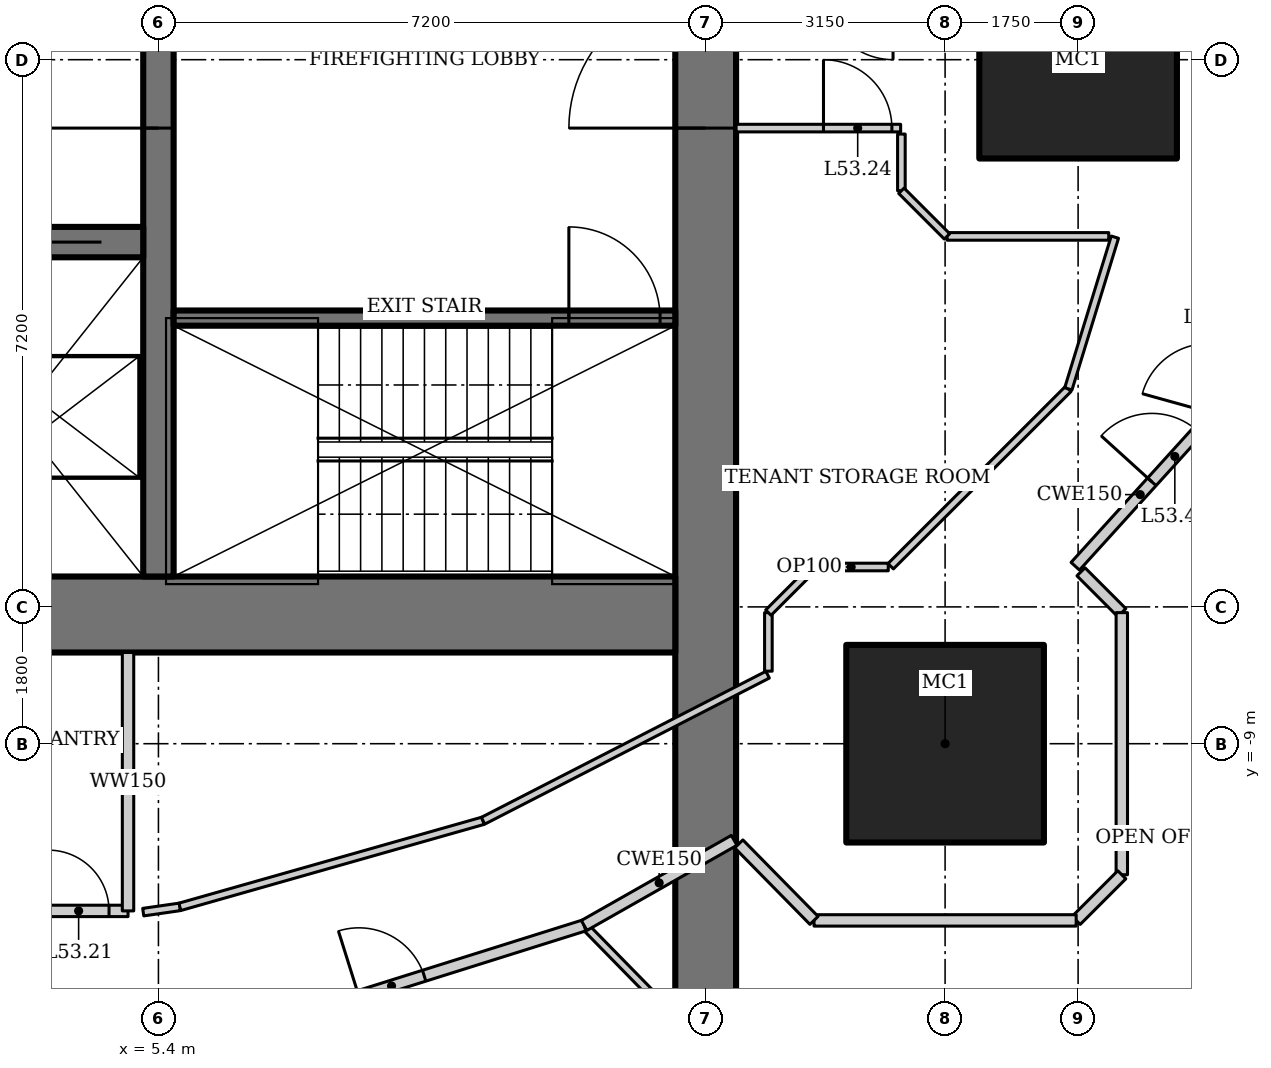
"""IFC4 building model, lengths in metres.
Left out: names, types, materials, properties, quantities, classifications, styles, units other than length and angle.
Written with IfcOpenShell. Run it as: python <this file> out.ifc"""

import sys

from ifc_helpers import new_model, si_unit, direction, frame, frame_2d, origin, origin_2d, place, context, subcontext, project, spatial, rectangle, hollow_rectangle, extrude, element, fill, save


model = new_model("IFC4")
c1 = context("Model", 3, precision=1e-05, world=origin(), true_north=direction((0.0, 1.0)))
c2 = subcontext(c1, "Body", "Model", "MODEL_VIEW")
j1 = project(units=[si_unit("LENGTHUNIT", "METRE"), si_unit("PLANEANGLEUNIT", "RADIAN")], contexts=[c1])
p1 = place(None, origin())
s1 = spatial("IfcSite", under=j1, at=p1, CompositionType="ELEMENT")
p2 = place(p1, origin())
s2 = spatial("IfcBuilding", under=s1, at=p2, CompositionType="ELEMENT")
p3 = place(p2, frame((0.0, 0.0, 228.4)))
s3 = spatial("IfcBuildingStorey", under=s2, at=p3, CompositionType="ELEMENT", Elevation=228.4)
for number, where, z_axis, x_axis in (
    (1, (17.5, 0.0, 0.0), (0.0, 0.0, 1.0), (1.0, 0.0, 0.0)),
    (2, (15.75, -9.0, 0.0), (0.0, 0.0, 1.0), (1.0, 0.0, 0.0)),
):
    element("IfcColumn", number, at=place(p3, frame(where, z_axis=z_axis, x_axis=x_axis)), inside=s3, PredefinedType="COLUMN", context=c2, shape_type="SweptSolid", body=[
        extrude(hollow_rectangle(XDim=2.6, YDim=2.6, WallThickness=0.13, at=origin_2d()), origin(), (0.0, 0.0, 1.0), 4.2),
    ])
p4 = place(p3, frame((12.6, -13.0, 0.0), z_axis=(0.0, 0.0, 1.0), x_axis=(0.0, 1.0, 0.0)))
e3 = element("IfcWall", 3, at=p4, inside=s3, PredefinedType="SHEAR", context=c2, shape_type="SweptSolid", body=[
    extrude(rectangle(XDim=26.0, YDim=0.8, at=frame_2d((13.0, 0.0))), origin(), (0.0, 0.0, 1.0), 4.2),
])
p5 = place(p4, frame((12.1, 0.0, 0.0)))
e4 = element("IfcOpeningElement", 4, at=p5, cuts=e3, PredefinedType="OPENING", context=c2, shape_type="SweptSolid", body=[
    extrude(rectangle(XDim=1.8, YDim=2.1, at=frame_2d((0.9, 1.05))), frame((0.0, 0.41, 0.0), z_axis=(0.0, -1.0, 0.0), x_axis=(1.0, 0.0, 0.0)), (0.0, 0.0, 1.0), 0.82),
])
p6 = place(p3, frame((-12.2, -7.3, 0.0), z_axis=(0.0, 0.0, 1.0), x_axis=(1.0, 0.0, 0.0)))
e5 = element("IfcWall", 5, at=p6, inside=s3, PredefinedType="SHEAR", context=c2, shape_type="SweptSolid", body=[
    extrude(rectangle(XDim=24.4, YDim=1.0, at=frame_2d((12.2, 0.0))), origin(), (0.0, 0.0, 1.0), 4.2),
])
p7 = place(p3, frame((5.4, -6.8, 0.0), z_axis=(0.0, 0.0, 1.0), x_axis=(0.0, 1.0, 0.0)))
e6 = element("IfcWall", 6, at=p7, inside=s3, PredefinedType="SHEAR", context=c2, shape_type="SweptSolid", body=[
    extrude(rectangle(XDim=14.6, YDim=0.4, at=frame_2d((7.3, 0.0))), origin(), (0.0, 0.0, 1.0), 4.2),
])
p8 = place(p7, frame((5.9, 0.0, 0.0)))
e7 = element("IfcOpeningElement", 7, at=p8, cuts=e6, PredefinedType="OPENING", context=c2, shape_type="SweptSolid", body=[
    extrude(rectangle(XDim=1.8, YDim=2.1, at=frame_2d((0.9, 1.05))), frame((0.0, 0.21, 0.0), z_axis=(0.0, -1.0, 0.0), x_axis=(1.0, 0.0, 0.0)), (0.0, 0.0, 1.0), 0.42),
])
p9 = place(p3, frame((-5.2, -2.4, 0.0), z_axis=(0.0, 0.0, 1.0), x_axis=(1.0, 0.0, 0.0)))
e8 = element("IfcWall", 8, at=p9, inside=s3, PredefinedType="SHEAR", context=c2, shape_type="SweptSolid", body=[
    extrude(rectangle(XDim=10.4, YDim=0.4, at=frame_2d((5.2, 0.0))), origin(), (0.0, 0.0, 1.0), 4.2),
])
p10 = place(p9, frame((1.683, 0.0, 0.0)))
e9 = element("IfcOpeningElement", 9, at=p10, cuts=e8, PredefinedType="OPENING", context=c2, shape_type="SweptSolid", body=[
    extrude(rectangle(XDim=1.1, YDim=2.2, at=frame_2d((0.55, 1.1))), frame((0.0, 0.21, 0.0), z_axis=(0.0, -1.0, 0.0), x_axis=(1.0, 0.0, 0.0)), (0.0, 0.0, 1.0), 0.42),
])
p11 = place(p9, frame((5.217, 0.0, 0.0)))
e10 = element("IfcOpeningElement", 10, at=p11, cuts=e8, PredefinedType="OPENING", context=c2, shape_type="SweptSolid", body=[
    extrude(rectangle(XDim=1.1, YDim=2.2, at=frame_2d((0.55, 1.1))), frame((0.0, 0.21, 0.0), z_axis=(0.0, -1.0, 0.0), x_axis=(1.0, 0.0, 0.0)), (0.0, 0.0, 1.0), 0.42),
])
p12 = place(p9, frame((8.75, 0.0, 0.0)))
e11 = element("IfcOpeningElement", 11, at=p12, cuts=e8, PredefinedType="OPENING", context=c2, shape_type="SweptSolid", body=[
    extrude(rectangle(XDim=1.1, YDim=2.2, at=frame_2d((0.55, 1.1))), frame((0.0, 0.21, 0.0), z_axis=(0.0, -1.0, 0.0), x_axis=(1.0, 0.0, 0.0)), (0.0, 0.0, 1.0), 0.42),
])
p13 = place(p3, frame((5.6, -3.4, 0.0), z_axis=(0.0, 0.0, 1.0), x_axis=(1.0, 0.0, 0.0)))
e12 = element("IfcWall", 12, at=p13, inside=s3, PredefinedType="SHEAR", context=c2, shape_type="SweptSolid", body=[
    extrude(rectangle(XDim=6.6, YDim=0.2, at=frame_2d((3.3, 0.0))), origin(), (0.0, 0.0, 1.0), 4.2),
])
p14 = place(p13, frame((5.2, 0.0, 0.0)))
e13 = element("IfcOpeningElement", 13, at=p14, cuts=e12, PredefinedType="OPENING", context=c2, shape_type="SweptSolid", body=[
    extrude(rectangle(XDim=1.2, YDim=2.1, at=frame_2d((0.6, 1.05))), frame((0.0, 0.11, 0.0), z_axis=(0.0, -1.0, 0.0), x_axis=(1.0, 0.0, 0.0)), (0.0, 0.0, 1.0), 0.22),
])
p15 = place(p3, frame((15.709, -16.199, 0.0), z_axis=(0.0, 0.0, 1.0), x_axis=(-0.699758297028, 0.71437967898, 0.0)))
e14 = element("IfcWall", 14, at=p15, inside=s3, PredefinedType="PARTITIONING", context=c2, shape_type="SweptSolid", body=[
    extrude(rectangle(XDim=6.729, YDim=0.1, at=frame_2d((3.365, 0.0))), origin(), (0.0, 0.0, 1.0), 3.41),
])
p16 = place(p3, frame((6.521, -12.799, 0.0), z_axis=(0.0, 0.0, 1.0), x_axis=(0.954031103669, 0.299707612903, 0.0)))
e15 = element("IfcWall", 15, at=p16, inside=s3, PredefinedType="PARTITIONING", context=c2, shape_type="SweptSolid", body=[
    extrude(rectangle(XDim=4.695, YDim=0.15, at=frame_2d((2.348, 0.0))), origin(), (0.0, 0.0, 1.0), 4.05),
])
p17 = place(p16, frame((1.589, 0.0, 0.0)))
e16 = element("IfcOpeningElement", 16, at=p17, cuts=e15, PredefinedType="OPENING", context=c2, shape_type="SweptSolid", body=[
    extrude(rectangle(XDim=0.9, YDim=2.1, at=frame_2d((0.45, 1.05))), frame((0.0, 0.085, 0.0), z_axis=(0.0, -1.0, 0.0), x_axis=(1.0, 0.0, 0.0)), (0.0, 0.0, 1.0), 0.17),
])
p18 = place(p3, frame((-5.0, -11.2, 0.0), z_axis=(0.0, 0.0, 1.0), x_axis=(1.0, 0.0, 0.0)))
e17 = element("IfcWall", 17, at=p18, inside=s3, PredefinedType="SOLIDWALL", context=c2, shape_type="SweptSolid", body=[
    extrude(rectangle(XDim=10.0, YDim=0.15, at=frame_2d((5.0, 0.0))), origin(), (0.0, 0.0, 1.0), 4.05),
])
p19 = place(p18, frame((0.45, 0.0, 0.0)))
e18 = element("IfcOpeningElement", 18, at=p19, cuts=e17, PredefinedType="OPENING", context=c2, shape_type="SweptSolid", body=[
    extrude(rectangle(XDim=1.0, YDim=2.1, at=frame_2d((0.5, 1.05))), frame((0.0, 0.085, 0.0), z_axis=(0.0, -1.0, 0.0), x_axis=(1.0, 0.0, 0.0)), (0.0, 0.0, 1.0), 0.17),
])
p20 = place(p18, frame((3.15, 0.0, 0.0)))
e19 = element("IfcOpeningElement", 19, at=p20, cuts=e17, PredefinedType="OPENING", context=c2, shape_type="SweptSolid", body=[
    extrude(rectangle(XDim=0.9, YDim=2.1, at=frame_2d((0.45, 1.05))), frame((0.0, 0.085, 0.0), z_axis=(0.0, -1.0, 0.0), x_axis=(1.0, 0.0, 0.0)), (0.0, 0.0, 1.0), 0.17),
])
p21 = place(p18, frame((6.55, 0.0, 0.0)))
e20 = element("IfcOpeningElement", 20, at=p21, cuts=e17, PredefinedType="OPENING", context=c2, shape_type="SweptSolid", body=[
    extrude(rectangle(XDim=0.9, YDim=2.1, at=frame_2d((0.45, 1.05))), frame((0.0, 0.085, 0.0), z_axis=(0.0, -1.0, 0.0), x_axis=(1.0, 0.0, 0.0)), (0.0, 0.0, 1.0), 0.17),
])
p22 = place(p18, frame((8.95, 0.0, 0.0)))
e21 = element("IfcOpeningElement", 21, at=p22, cuts=e17, PredefinedType="OPENING", context=c2, shape_type="SweptSolid", body=[
    extrude(rectangle(XDim=0.8, YDim=2.1, at=frame_2d((0.4, 1.05))), frame((0.0, 0.085, 0.0), z_axis=(0.0, -1.0, 0.0), x_axis=(1.0, 0.0, 0.0)), (0.0, 0.0, 1.0), 0.17),
])
p23 = place(p3, frame((5.0, -7.8, 0.0), z_axis=(0.0, 0.0, 1.0), x_axis=(0.0, -1.0, 0.0)))
e22 = element("IfcWall", 22, at=p23, inside=s3, PredefinedType="SOLIDWALL", context=c2, shape_type="SweptSolid", body=[
    extrude(rectangle(XDim=3.4, YDim=0.15, at=frame_2d((1.7, 0.0))), origin(), (0.0, 0.0, 1.0), 4.05),
])
p24 = place(p3, frame((9.67, -10.014, 0.0), z_axis=(0.0, 0.0, 1.0), x_axis=(-0.961973498971, -0.273142796496, 0.0)))
e23 = element("IfcWall", 23, at=p24, inside=s3, PredefinedType="PARTITIONING", context=c2, shape_type="SweptSolid", body=[
    extrude(rectangle(XDim=4.148, YDim=0.1, at=frame_2d((2.074, 0.0))), origin(), (0.0, 0.0, 1.0), 4.05),
])
p25 = place(p3, frame((5.68, -11.147, 0.0), z_axis=(0.0, 0.0, 1.0), x_axis=(-0.989797891768, -0.142478536811, 0.0)))
e24 = element("IfcWall", 24, at=p25, inside=s3, PredefinedType="PARTITIONING", context=c2, shape_type="SweptSolid", body=[
    extrude(rectangle(XDim=0.485, YDim=0.1, at=frame_2d((0.242, 0.0))), origin(), (0.0, 0.0, 1.0), 4.05),
])
p26 = place(p3, frame((11.001, -11.392, 0.0), z_axis=(0.0, 0.0, 1.0), x_axis=(0.869722107117, 0.493541747366, 0.0)))
e25 = element("IfcWall", 25, at=p26, inside=s3, PredefinedType="PARTITIONING", context=c2, shape_type="SweptSolid", body=[
    extrude(rectangle(XDim=2.27, YDim=0.15, at=frame_2d((1.135, 0.0))), origin(), (0.0, 0.0, 1.0), 4.05),
])
p27 = place(p3, frame((17.463, -6.665, 0.0), z_axis=(0.0, 0.0, 1.0), x_axis=(0.671721890643, 0.74080341632, 0.0)))
e26 = element("IfcWall", 26, at=p27, inside=s3, PredefinedType="PARTITIONING", context=c2, shape_type="SweptSolid", body=[
    extrude(rectangle(XDim=2.544, YDim=0.15, at=frame_2d((1.272, 0.0))), origin(), (0.0, 0.0, 1.0), 4.05),
])
p28 = place(p27, frame((1.5, 0.0, 0.0)))
e27 = element("IfcOpeningElement", 27, at=p28, cuts=e26, PredefinedType="OPENING", context=c2, shape_type="SweptSolid", body=[
    extrude(rectangle(XDim=0.9, YDim=2.1, at=frame_2d((0.45, 1.05))), frame((0.0, 0.085, 0.0), z_axis=(0.0, -1.0, 0.0), x_axis=(1.0, 0.0, 0.0)), (0.0, 0.0, 1.0), 0.17),
])
p29 = place(p3, frame((17.372, -4.331, 0.0), z_axis=(0.0, 0.0, 1.0), x_axis=(-0.707587114823, -0.70662612104, 0.0)))
e28 = element("IfcWall", 28, at=p29, inside=s3, PredefinedType="PARTITIONING", context=c2, shape_type="SweptSolid", body=[
    extrude(rectangle(XDim=3.303, YDim=0.1, at=frame_2d((1.651, 0.0))), origin(), (0.0, 0.0, 1.0), 4.05),
])
p30 = place(p3, frame((13.415, -8.092, 0.0), z_axis=(0.0, 0.0, 1.0), x_axis=(-0.889620520549, -0.45670048108, 0.0)))
e29 = element("IfcWall", 29, at=p30, inside=s3, PredefinedType="PARTITIONING", context=c2, shape_type="SweptSolid", body=[
    extrude(rectangle(XDim=4.209, YDim=0.1, at=frame_2d((2.104, 0.0))), origin(), (0.0, 0.0, 1.0), 4.05),
])
p31 = place(p3, frame((13.425, -8.046, 0.0), z_axis=(0.0, 0.0, 1.0), x_axis=(0.0, 1.0, 0.0)))
e30 = element("IfcWall", 30, at=p31, inside=s3, PredefinedType="PARTITIONING", context=c2, shape_type="SweptSolid", body=[
    extrude(rectangle(XDim=0.77, YDim=0.1, at=frame_2d((0.385, 0.0))), origin(), (0.0, 0.0, 1.0), 4.05),
])
p32 = place(p3, frame((13.425, -7.275, 0.0), z_axis=(0.0, 0.0, 1.0), x_axis=(0.707106781187, 0.707106781187, 0.0)))
e31 = element("IfcWall", 31, at=p32, inside=s3, PredefinedType="PARTITIONING", context=c2, shape_type="SweptSolid", body=[
    extrude(rectangle(XDim=0.849, YDim=0.1, at=frame_2d((0.425, 0.0))), origin(), (0.0, 0.0, 1.0), 4.05),
])
p33 = place(p3, frame((14.025, -6.675, 0.0), z_axis=(0.0, 0.0, 1.0), x_axis=(1.0, 0.0, 0.0)))
e32 = element("IfcWall", 32, at=p33, inside=s3, PredefinedType="PARTITIONING", context=c2, shape_type="SweptSolid", body=[
    extrude(rectangle(XDim=0.977, YDim=0.1, at=frame_2d((0.488, 0.0))), origin(), (0.0, 0.0, 1.0), 4.05),
])
p34 = place(p3, frame((17.538, -6.738, 0.0), z_axis=(0.0, 0.0, 1.0), x_axis=(0.707106781187, -0.707106781187, 0.0)))
e33 = element("IfcWall", 33, at=p34, inside=s3, PredefinedType="PARTITIONING", context=c2, shape_type="SweptSolid", body=[
    extrude(rectangle(XDim=0.76, YDim=0.15, at=frame_2d((0.38, 0.0))), origin(), (0.0, 0.0, 1.0), 4.05),
])
p35 = place(p3, frame((18.075, -7.275, 0.0), z_axis=(0.0, 0.0, 1.0), x_axis=(0.0, -1.0, 0.0)))
e34 = element("IfcWall", 34, at=p35, inside=s3, PredefinedType="PARTITIONING", context=c2, shape_type="SweptSolid", body=[
    extrude(rectangle(XDim=3.449, YDim=0.15, at=frame_2d((1.725, 0.0))), origin(), (0.0, 0.0, 1.0), 3.601),
])
p36 = place(p3, frame((18.075, -10.725, 0.0), z_axis=(0.0, 0.0, 1.0), x_axis=(-0.707106781187, -0.707106781187, 0.0)))
e35 = element("IfcWall", 35, at=p36, inside=s3, PredefinedType="PARTITIONING", context=c2, shape_type="SweptSolid", body=[
    extrude(rectangle(XDim=0.849, YDim=0.15, at=frame_2d((0.425, 0.0))), origin(), (0.0, 0.0, 1.0), 4.05),
])
p37 = place(p3, frame((17.475, -11.325, 0.0), z_axis=(0.0, 0.0, 1.0), x_axis=(-1.0, 0.0, 0.0)))
e36 = element("IfcWall", 36, at=p37, inside=s3, PredefinedType="PARTITIONING", context=c2, shape_type="SweptSolid", body=[
    extrude(rectangle(XDim=3.449, YDim=0.15, at=frame_2d((1.725, 0.0))), origin(), (0.0, 0.0, 1.0), 4.05),
])
p38 = place(p3, frame((14.025, -11.325, 0.0), z_axis=(0.0, 0.0, 1.0), x_axis=(-0.701113567316, 0.713049623606, 0.0)))
e37 = element("IfcWall", 37, at=p38, inside=s3, PredefinedType="PARTITIONING", context=c2, shape_type="SweptSolid", body=[
    extrude(rectangle(XDim=1.411, YDim=0.15, at=frame_2d((0.706, 0.0))), origin(), (0.0, 0.0, 1.0), 4.05),
])
p39 = place(p3, frame((13.0, -0.9, 0.0), z_axis=(0.0, 0.0, 1.0), x_axis=(1.0, 0.0, 0.0)))
e38 = element("IfcWall", 38, at=p39, inside=s3, PredefinedType="PARTITIONING", context=c2, shape_type="SweptSolid", body=[
    extrude(rectangle(XDim=2.165, YDim=0.1, at=frame_2d((1.083, 0.0))), origin(), (0.0, 0.0, 1.0), 4.05),
])
p40 = place(p39, frame((1.15, 0.0, 0.0)))
e39 = element("IfcOpeningElement", 39, at=p40, cuts=e38, PredefinedType="OPENING", context=c2, shape_type="SweptSolid", body=[
    extrude(rectangle(XDim=0.9, YDim=2.1, at=frame_2d((0.45, 1.05))), frame((0.0, 0.06, 0.0), z_axis=(0.0, -1.0, 0.0), x_axis=(1.0, 0.0, 0.0)), (0.0, 0.0, 1.0), 0.12),
])
p41 = place(p3, frame((17.984, -2.335, 0.0), z_axis=(0.0, 0.0, 1.0), x_axis=(-0.293231279211, -0.956041535129, 0.0)))
e40 = element("IfcWall", 40, at=p41, inside=s3, PredefinedType="PARTITIONING", context=c2, shape_type="SweptSolid", body=[
    extrude(rectangle(XDim=2.088, YDim=0.1, at=frame_2d((1.044, 0.0))), origin(), (0.0, 0.0, 1.0), 4.05),
])
p42 = place(p3, frame((15.175, -1.725, 0.0), z_axis=(0.0, 0.0, 1.0), x_axis=(0.0, 1.0, 0.0)))
e41 = element("IfcWall", 41, at=p42, inside=s3, PredefinedType="PARTITIONING", context=c2, shape_type="SweptSolid", body=[
    extrude(rectangle(XDim=0.746, YDim=0.1, at=frame_2d((0.373, 0.0))), origin(), (0.0, 0.0, 1.0), 4.05),
])
p43 = place(p3, frame((17.903, -2.325, 0.0), z_axis=(0.0, 0.0, 1.0), x_axis=(-1.0, 0.0, 0.0)))
e42 = element("IfcWall", 42, at=p43, inside=s3, PredefinedType="PARTITIONING", context=c2, shape_type="SweptSolid", body=[
    extrude(rectangle(XDim=2.128, YDim=0.1, at=frame_2d((1.064, 0.0))), origin(), (0.0, 0.0, 1.0), 4.05),
])
p44 = place(p3, frame((15.775, -2.325, 0.0), z_axis=(0.0, 0.0, 1.0), x_axis=(-0.707106781187, 0.707106781187, 0.0)))
e43 = element("IfcWall", 43, at=p44, inside=s3, PredefinedType="PARTITIONING", context=c2, shape_type="SweptSolid", body=[
    extrude(rectangle(XDim=0.849, YDim=0.1, at=frame_2d((0.425, 0.0))), origin(), (0.0, 0.0, 1.0), 4.05),
])
p45 = place(p8, origin())
e44 = element("IfcDoor", 44, at=p45, inside=s3, OperationType="DOUBLE_DOOR_DOUBLE_SWING", PredefinedType="DOOR", context=c2, shape_type="SweptSolid", body=[
    extrude(rectangle(XDim=1.8, YDim=2.1, at=frame_2d((0.9, 1.05))), frame((0.0, 0.025, 0.0), z_axis=(0.0, -1.0, 0.0), x_axis=(1.0, 0.0, 0.0)), (0.0, 0.0, 1.0), 0.05),
])
fill(e7, e44)
p46 = place(p14, origin())
e45 = element("IfcDoor", 45, at=p46, inside=s3, OperationType="SINGLE_SWING_RIGHT", PredefinedType="DOOR", context=c2, shape_type="SweptSolid", body=[
    extrude(rectangle(XDim=1.2, YDim=2.1, at=frame_2d((0.6, 1.05))), frame((0.0, 0.025, 0.0), z_axis=(0.0, -1.0, 0.0), x_axis=(1.0, 0.0, 0.0)), (0.0, 0.0, 1.0), 0.05),
])
fill(e13, e45)
p47 = place(p5, origin())
e46 = element("IfcDoor", 46, at=p47, inside=s3, OperationType="DOUBLE_DOOR_DOUBLE_SWING", PredefinedType="DOOR", context=c2, shape_type="SweptSolid", body=[
    extrude(rectangle(XDim=1.8, YDim=2.1, at=frame_2d((0.9, 1.05))), frame((0.0, 0.025, 0.0), z_axis=(0.0, -1.0, 0.0), x_axis=(1.0, 0.0, 0.0)), (0.0, 0.0, 1.0), 0.05),
])
fill(e4, e46)
p48 = place(p12, origin())
e47 = element("IfcDoor", 47, at=p48, inside=s3, OperationType="DOUBLE_DOOR_SLIDING", PredefinedType="DOOR", context=c2, shape_type="SweptSolid", body=[
    extrude(rectangle(XDim=1.1, YDim=2.2, at=frame_2d((0.55, 1.1))), frame((0.0, 0.025, 0.0), z_axis=(0.0, -1.0, 0.0), x_axis=(1.0, 0.0, 0.0)), (0.0, 0.0, 1.0), 0.05),
])
fill(e11, e47)
p49 = place(p22, origin())
e48 = element("IfcDoor", 48, at=p49, inside=s3, OperationType="SINGLE_SWING_LEFT", PredefinedType="DOOR", context=c2, shape_type="SweptSolid", body=[
    extrude(rectangle(XDim=0.8, YDim=2.1, at=frame_2d((0.4, 1.05))), frame((0.0, 0.025, 0.0), z_axis=(0.0, -1.0, 0.0), x_axis=(1.0, 0.0, 0.0)), (0.0, 0.0, 1.0), 0.05),
])
fill(e21, e48)
p50 = place(p40, origin())
e49 = element("IfcDoor", 49, at=p50, inside=s3, OperationType="SINGLE_SWING_LEFT", PredefinedType="DOOR", context=c2, shape_type="SweptSolid", body=[
    extrude(rectangle(XDim=0.9, YDim=2.1, at=frame_2d((0.45, 1.05))), frame((0.0, 0.025, 0.0), z_axis=(0.0, -1.0, 0.0), x_axis=(1.0, 0.0, 0.0)), (0.0, 0.0, 1.0), 0.05),
])
fill(e39, e49)
p51 = place(p17, origin())
e50 = element("IfcDoor", 50, at=p51, inside=s3, OperationType="SINGLE_SWING_LEFT", PredefinedType="DOOR", context=c2, shape_type="SweptSolid", body=[
    extrude(rectangle(XDim=0.9, YDim=2.1, at=frame_2d((0.45, 1.05))), frame((0.0, 0.025, 0.0), z_axis=(0.0, -1.0, 0.0), x_axis=(1.0, 0.0, 0.0)), (0.0, 0.0, 1.0), 0.05),
])
fill(e16, e50)
p52 = place(p28, origin())
e51 = element("IfcDoor", 51, at=p52, inside=s3, OperationType="SINGLE_SWING_LEFT", PredefinedType="DOOR", context=c2, shape_type="SweptSolid", body=[
    extrude(rectangle(XDim=0.9, YDim=2.1, at=frame_2d((0.45, 1.05))), frame((0.0, 0.025, 0.0), z_axis=(0.0, -1.0, 0.0), x_axis=(1.0, 0.0, 0.0)), (0.0, 0.0, 1.0), 0.05),
])
fill(e27, e51)
save(model, sys.argv[1])
